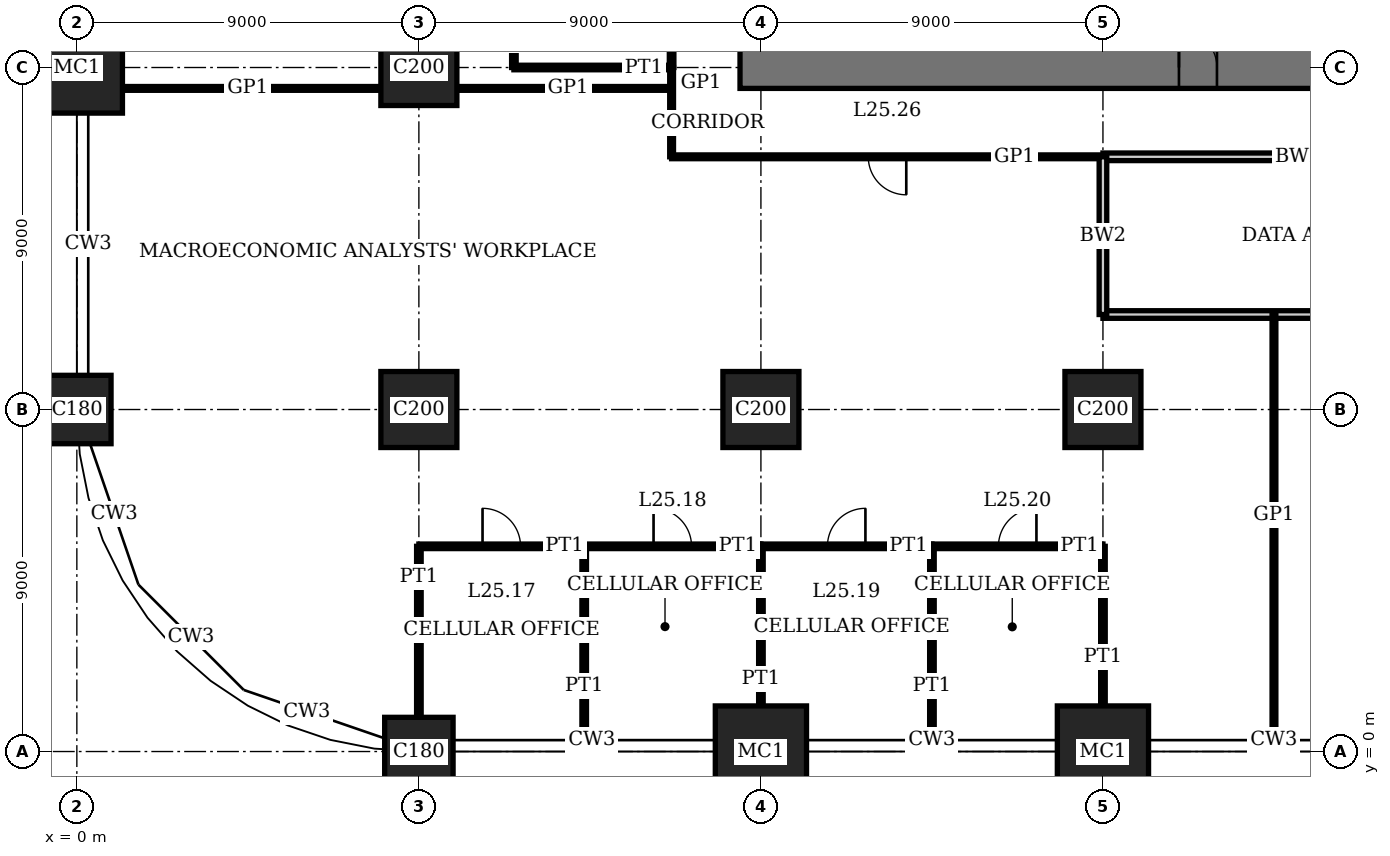
"""IFC4 building model, lengths in metres.
Left out: names, types, materials, properties, quantities, classifications, styles, units other than length and angle.
Written with IfcOpenShell. Run it as: python <this file> out.ifc"""

import sys

from ifc_helpers import new_model, si_unit, direction, frame, frame_2d, origin, origin_2d, place, context, subcontext, project, spatial, rectangle, extrude, element, fill, save


model = new_model("IFC4")
c1 = context("Model", 3, precision=1e-05, world=origin(), true_north=direction((0.0, 1.0)))
c2 = subcontext(c1, "Body", "Model", "MODEL_VIEW")
j1 = project(units=[si_unit("LENGTHUNIT", "METRE"), si_unit("PLANEANGLEUNIT", "RADIAN")], contexts=[c1])
p1 = place(None, origin())
s1 = spatial("IfcSite", under=j1, at=p1, CompositionType="ELEMENT")
p2 = place(p1, origin())
s2 = spatial("IfcBuilding", under=s1, at=p2, CompositionType="ELEMENT")
p3 = place(p2, frame((0.0, 0.0, 105.0)))
s3 = spatial("IfcBuildingStorey", under=s2, at=p3, CompositionType="ELEMENT", Elevation=105.0)
p4 = place(p3, frame((0.0, 9.0, 0.0), z_axis=(0.0, 0.0, 1.0), x_axis=(1.0, 0.0, 0.0)))
e1 = element("IfcColumn", 1, at=p4, inside=s3, PredefinedType="COLUMN", context=c2, shape_type="SweptSolid", body=[
    extrude(rectangle(XDim=1.8, YDim=1.8, at=origin_2d()), origin(), (0.0, 0.0, 1.0), 4.0),
])
p5 = place(p3, frame((0.0, 18.0, 0.0), z_axis=(0.0, 0.0, 1.0), x_axis=(1.0, 0.0, 0.0)))
e2 = element("IfcColumn", 2, at=p5, inside=s3, PredefinedType="COLUMN", context=c2, shape_type="SweptSolid", body=[
    extrude(rectangle(XDim=2.4, YDim=2.4, at=origin_2d()), origin(), (0.0, 0.0, 1.0), 4.0),
])
p6 = place(p3, frame((9.0, 0.0, 0.0), z_axis=(0.0, 0.0, 1.0), x_axis=(1.0, 0.0, 0.0)))
e3 = element("IfcColumn", 3, at=p6, inside=s3, PredefinedType="COLUMN", context=c2, shape_type="SweptSolid", body=[
    extrude(rectangle(XDim=1.8, YDim=1.8, at=origin_2d()), origin(), (0.0, 0.0, 1.0), 4.0),
])
for number, where, z_axis, x_axis in (
    (4, (9.0, 9.0, 0.0), (0.0, 0.0, 1.0), (1.0, 0.0, 0.0)),
    (5, (9.0, 18.0, 0.0), (0.0, 0.0, 1.0), (1.0, 0.0, 0.0)),
):
    element("IfcColumn", number, at=place(p3, frame(where, z_axis=z_axis, x_axis=x_axis)), inside=s3, PredefinedType="COLUMN", context=c2, shape_type="SweptSolid", body=[
        extrude(rectangle(XDim=2.0, YDim=2.0, at=origin_2d()), origin(), (0.0, 0.0, 1.0), 4.0),
    ])
p7 = place(p3, frame((18.0, 0.0, 0.0), z_axis=(0.0, 0.0, 1.0), x_axis=(1.0, 0.0, 0.0)))
e6 = element("IfcColumn", 6, at=p7, inside=s3, PredefinedType="COLUMN", context=c2, shape_type="SweptSolid", body=[
    extrude(rectangle(XDim=2.4, YDim=2.4, at=origin_2d()), origin(), (0.0, 0.0, 1.0), 4.0),
])
p8 = place(p3, frame((18.0, 9.0, 0.0), z_axis=(0.0, 0.0, 1.0), x_axis=(1.0, 0.0, 0.0)))
e7 = element("IfcColumn", 7, at=p8, inside=s3, PredefinedType="COLUMN", context=c2, shape_type="SweptSolid", body=[
    extrude(rectangle(XDim=2.0, YDim=2.0, at=origin_2d()), origin(), (0.0, 0.0, 1.0), 4.0),
])
p9 = place(p3, frame((27.0, 0.0, 0.0), z_axis=(0.0, 0.0, 1.0), x_axis=(1.0, 0.0, 0.0)))
e8 = element("IfcColumn", 8, at=p9, inside=s3, PredefinedType="COLUMN", context=c2, shape_type="SweptSolid", body=[
    extrude(rectangle(XDim=2.4, YDim=2.4, at=origin_2d()), origin(), (0.0, 0.0, 1.0), 4.0),
])
p10 = place(p3, frame((27.0, 9.0, 0.0), z_axis=(0.0, 0.0, 1.0), x_axis=(1.0, 0.0, 0.0)))
e9 = element("IfcColumn", 9, at=p10, inside=s3, PredefinedType="COLUMN", context=c2, shape_type="SweptSolid", body=[
    extrude(rectangle(XDim=2.0, YDim=2.0, at=origin_2d()), origin(), (0.0, 0.0, 1.0), 4.0),
])
p11 = place(p3, frame((17.45, 18.0, 0.0), z_axis=(0.0, 0.0, 1.0), x_axis=(1.0, 0.0, 0.0)))
e10 = element("IfcWall", 10, at=p11, inside=s3, PredefinedType="SHEAR", context=c2, shape_type="SweptSolid", body=[
    extrude(rectangle(XDim=28.1, YDim=1.1, at=frame_2d((14.05, 0.0))), origin(), (0.0, 0.0, 1.0), 4.0),
])
p12 = place(p11, frame((11.55, 0.0, 0.0)))
e11 = element("IfcOpeningElement", 11, at=p12, cuts=e10, PredefinedType="OPENING", context=c2, shape_type="SweptSolid", body=[
    extrude(rectangle(XDim=1.0, YDim=2.4, at=frame_2d((0.5, 1.2))), frame((0.0, 0.56, 0.0), z_axis=(0.0, -1.0, 0.0), x_axis=(1.0, 0.0, 0.0)), (0.0, 0.0, 1.0), 1.12),
])
p13 = place(p11, frame((16.55, 0.0, 0.0)))
e12 = element("IfcOpeningElement", 12, at=p13, cuts=e10, PredefinedType="OPENING", context=c2, shape_type="SweptSolid", body=[
    extrude(rectangle(XDim=1.0, YDim=2.4, at=frame_2d((0.5, 1.2))), frame((0.0, 0.56, 0.0), z_axis=(0.0, -1.0, 0.0), x_axis=(1.0, 0.0, 0.0)), (0.0, 0.0, 1.0), 1.12),
])
p14 = place(p11, frame((20.0, 0.0, 0.0)))
e13 = element("IfcOpeningElement", 13, at=p14, cuts=e10, PredefinedType="OPENING", context=c2, shape_type="SweptSolid", body=[
    extrude(rectangle(XDim=1.1, YDim=2.4, at=frame_2d((0.55, 1.2))), frame((0.0, 0.56, 0.0), z_axis=(0.0, -1.0, 0.0), x_axis=(1.0, 0.0, 0.0)), (0.0, 0.0, 1.0), 1.12),
])
p15 = place(p11, frame((24.05, 0.0, 0.0)))
e14 = element("IfcOpeningElement", 14, at=p15, cuts=e10, PredefinedType="OPENING", context=c2, shape_type="SweptSolid", body=[
    extrude(rectangle(XDim=1.0, YDim=2.4, at=frame_2d((0.5, 1.2))), frame((0.0, 0.56, 0.0), z_axis=(0.0, -1.0, 0.0), x_axis=(1.0, 0.0, 0.0)), (0.0, 0.0, 1.0), 1.12),
])
p16 = place(p3, frame((9.0, 5.4, 0.0), z_axis=(0.0, 0.0, 1.0), x_axis=(1.0, 0.0, 0.0)))
e15 = element("IfcWall", 15, at=p16, inside=s3, PredefinedType="PARTITIONING", context=c2, shape_type="SweptSolid", body=[
    extrude(rectangle(XDim=4.35, YDim=0.12, at=frame_2d((2.175, 0.0))), origin(), (0.0, 0.0, 1.0), 3.75),
])
p17 = place(p16, frame((1.675, 0.0, 0.0)))
e16 = element("IfcOpeningElement", 16, at=p17, cuts=e15, PredefinedType="OPENING", context=c2, shape_type="SweptSolid", body=[
    extrude(rectangle(XDim=1.0, YDim=2.4, at=frame_2d((0.5, 1.2))), frame((0.0, 0.07, 0.0), z_axis=(0.0, -1.0, 0.0), x_axis=(1.0, 0.0, 0.0)), (0.0, 0.0, 1.0), 0.14),
])
p18 = place(p3, frame((13.35, 5.4, 0.0), z_axis=(0.0, 0.0, 1.0), x_axis=(1.0, 0.0, 0.0)))
e17 = element("IfcWall", 17, at=p18, inside=s3, PredefinedType="PARTITIONING", context=c2, shape_type="SweptSolid", body=[
    extrude(rectangle(XDim=4.65, YDim=0.12, at=frame_2d((2.325, 0.0))), origin(), (0.0, 0.0, 1.0), 3.75),
])
p19 = place(p18, frame((1.825, 0.0, 0.0)))
e18 = element("IfcOpeningElement", 18, at=p19, cuts=e17, PredefinedType="OPENING", context=c2, shape_type="SweptSolid", body=[
    extrude(rectangle(XDim=1.0, YDim=2.4, at=frame_2d((0.5, 1.2))), frame((0.0, 0.07, 0.0), z_axis=(0.0, -1.0, 0.0), x_axis=(1.0, 0.0, 0.0)), (0.0, 0.0, 1.0), 0.14),
])
p20 = place(p3, frame((18.0, 5.4, 0.0), z_axis=(0.0, 0.0, 1.0), x_axis=(1.0, 0.0, 0.0)))
e19 = element("IfcWall", 19, at=p20, inside=s3, PredefinedType="PARTITIONING", context=c2, shape_type="SweptSolid", body=[
    extrude(rectangle(XDim=4.5, YDim=0.12, at=frame_2d((2.25, 0.0))), origin(), (0.0, 0.0, 1.0), 3.75),
])
p21 = place(p20, frame((1.75, 0.0, 0.0)))
e20 = element("IfcOpeningElement", 20, at=p21, cuts=e19, PredefinedType="OPENING", context=c2, shape_type="SweptSolid", body=[
    extrude(rectangle(XDim=1.0, YDim=2.4, at=frame_2d((0.5, 1.2))), frame((0.0, 0.07, 0.0), z_axis=(0.0, -1.0, 0.0), x_axis=(1.0, 0.0, 0.0)), (0.0, 0.0, 1.0), 0.14),
])
p22 = place(p3, frame((22.5, 5.4, 0.0), z_axis=(0.0, 0.0, 1.0), x_axis=(1.0, 0.0, 0.0)))
e21 = element("IfcWall", 21, at=p22, inside=s3, PredefinedType="PARTITIONING", context=c2, shape_type="SweptSolid", body=[
    extrude(rectangle(XDim=4.5, YDim=0.12, at=frame_2d((2.25, 0.0))), origin(), (0.0, 0.0, 1.0), 3.75),
])
p23 = place(p22, frame((1.75, 0.0, 0.0)))
e22 = element("IfcOpeningElement", 22, at=p23, cuts=e21, PredefinedType="OPENING", context=c2, shape_type="SweptSolid", body=[
    extrude(rectangle(XDim=1.0, YDim=2.4, at=frame_2d((0.5, 1.2))), frame((0.0, 0.07, 0.0), z_axis=(0.0, -1.0, 0.0), x_axis=(1.0, 0.0, 0.0)), (0.0, 0.0, 1.0), 0.14),
])
p24 = place(p3, frame((27.0, 11.5, 0.0), z_axis=(0.0, 0.0, 1.0), x_axis=(1.0, 0.0, 0.0)))
e23 = element("IfcWall", 23, at=p24, inside=s3, PredefinedType="SOLIDWALL", context=c2, shape_type="SweptSolid", body=[
    extrude(rectangle(XDim=13.5, YDim=0.2, at=frame_2d((6.75, 0.0))), origin(), (0.0, 0.0, 1.0), 3.75),
])
p25 = place(p24, frame((6.25, 0.0, 0.0)))
e24 = element("IfcOpeningElement", 24, at=p25, cuts=e23, PredefinedType="OPENING", context=c2, shape_type="SweptSolid", body=[
    extrude(rectangle(XDim=1.0, YDim=2.4, at=frame_2d((0.5, 1.2))), frame((0.0, 0.11, 0.0), z_axis=(0.0, -1.0, 0.0), x_axis=(1.0, 0.0, 0.0)), (0.0, 0.0, 1.0), 0.22),
])
p26 = place(p3, frame((27.0, 15.65, 0.0), z_axis=(0.0, 0.0, 1.0), x_axis=(1.0, 0.0, 0.0)))
e25 = element("IfcWall", 25, at=p26, inside=s3, PredefinedType="SOLIDWALL", context=c2, shape_type="SweptSolid", body=[
    extrude(rectangle(XDim=13.5, YDim=0.2, at=frame_2d((6.75, 0.0))), origin(), (0.0, 0.0, 1.0), 3.75),
])
p27 = place(p3, frame((15.65, 15.65, 0.0), z_axis=(0.0, 0.0, 1.0), x_axis=(1.0, 0.0, 0.0)))
e26 = element("IfcWall", 26, at=p27, inside=s3, PredefinedType="PARTITIONING", context=c2, shape_type="SweptSolid", body=[
    extrude(rectangle(XDim=11.35, YDim=0.1, at=frame_2d((5.675, 0.0))), origin(), (0.0, 0.0, 1.0), 3.75),
])
p28 = place(p27, frame((5.175, 0.0, 0.0)))
e27 = element("IfcOpeningElement", 27, at=p28, cuts=e26, PredefinedType="OPENING", context=c2, shape_type="SweptSolid", body=[
    extrude(rectangle(XDim=1.0, YDim=2.4, at=frame_2d((0.5, 1.2))), frame((0.0, 0.06, 0.0), z_axis=(0.0, -1.0, 0.0), x_axis=(1.0, 0.0, 0.0)), (0.0, 0.0, 1.0), 0.12),
])
p29 = place(p3, frame((1.2, 17.45, 0.0), z_axis=(0.0, 0.0, 1.0), x_axis=(1.0, 0.0, 0.0)))
e28 = element("IfcWall", 28, at=p29, inside=s3, PredefinedType="PARTITIONING", context=c2, shape_type="SweptSolid", body=[
    extrude(rectangle(XDim=6.8, YDim=0.1, at=frame_2d((3.4, 0.0))), origin(), (0.0, 0.0, 1.0), 3.75),
])
p30 = place(p3, frame((10.0, 17.45, 0.0), z_axis=(0.0, 0.0, 1.0), x_axis=(1.0, 0.0, 0.0)))
e29 = element("IfcWall", 29, at=p30, inside=s3, PredefinedType="PARTITIONING", context=c2, shape_type="SweptSolid", body=[
    extrude(rectangle(XDim=5.65, YDim=0.1, at=frame_2d((2.825, 0.0))), origin(), (0.0, 0.0, 1.0), 3.75),
])
p31 = place(p3, frame((11.5, 18.0, 0.0), z_axis=(0.0, 0.0, 1.0), x_axis=(1.0, 0.0, 0.0)))
e30 = element("IfcWall", 30, at=p31, inside=s3, PredefinedType="PARTITIONING", context=c2, shape_type="SweptSolid", body=[
    extrude(rectangle(XDim=4.15, YDim=0.12, at=frame_2d((2.075, 0.0))), origin(), (0.0, 0.0, 1.0), 3.05),
])
p32 = place(p3, frame((9.0, 0.9, 0.0), z_axis=(0.0, 0.0, 1.0), x_axis=(0.0, 1.0, 0.0)))
e31 = element("IfcWall", 31, at=p32, inside=s3, PredefinedType="PARTITIONING", context=c2, shape_type="SweptSolid", body=[
    extrude(rectangle(XDim=4.5, YDim=0.12, at=frame_2d((2.25, 0.0))), origin(), (0.0, 0.0, 1.0), 3.05),
])
p33 = place(p3, frame((11.5, 18.0, 0.0), z_axis=(0.0, 0.0, 1.0), x_axis=(0.0, 1.0, 0.0)))
e32 = element("IfcWall", 32, at=p33, inside=s3, PredefinedType="PARTITIONING", context=c2, shape_type="SweptSolid", body=[
    extrude(rectangle(XDim=4.5, YDim=0.12, at=frame_2d((2.25, 0.0))), origin(), (0.0, 0.0, 1.0), 3.75),
])
p34 = place(p33, frame((1.75, 0.0, 0.0)))
e33 = element("IfcOpeningElement", 33, at=p34, cuts=e32, PredefinedType="OPENING", context=c2, shape_type="SweptSolid", body=[
    extrude(rectangle(XDim=1.0, YDim=2.4, at=frame_2d((0.5, 1.2))), frame((0.0, 0.07, 0.0), z_axis=(0.0, -1.0, 0.0), x_axis=(1.0, 0.0, 0.0)), (0.0, 0.0, 1.0), 0.14),
])
p35 = place(p3, frame((13.35, 0.31, 0.0), z_axis=(0.0, 0.0, 1.0), x_axis=(0.0, 1.0, 0.0)))
e34 = element("IfcWall", 34, at=p35, inside=s3, PredefinedType="PARTITIONING", context=c2, shape_type="SweptSolid", body=[
    extrude(rectangle(XDim=5.09, YDim=0.12, at=frame_2d((2.545, 0.0))), origin(), (0.0, 0.0, 1.0), 3.75),
])
p36 = place(p3, frame((15.65, 18.0, 0.0), z_axis=(0.0, 0.0, 1.0), x_axis=(0.0, 1.0, 0.0)))
e35 = element("IfcWall", 35, at=p36, inside=s3, PredefinedType="PARTITIONING", context=c2, shape_type="SweptSolid", body=[
    extrude(rectangle(XDim=4.5, YDim=0.12, at=frame_2d((2.25, 0.0))), origin(), (0.0, 0.0, 1.0), 3.75),
])
p37 = place(p3, frame((15.65, 15.65, 0.0), z_axis=(0.0, 0.0, 1.0), x_axis=(0.0, 1.0, 0.0)))
e36 = element("IfcWall", 36, at=p37, inside=s3, PredefinedType="PARTITIONING", context=c2, shape_type="SweptSolid", body=[
    extrude(rectangle(XDim=2.35, YDim=0.1, at=frame_2d((1.175, 0.0))), origin(), (0.0, 0.0, 1.0), 3.75),
])
p38 = place(p3, frame((18.0, 1.2, 0.0), z_axis=(0.0, 0.0, 1.0), x_axis=(0.0, 1.0, 0.0)))
e37 = element("IfcWall", 37, at=p38, inside=s3, PredefinedType="PARTITIONING", context=c2, shape_type="SweptSolid", body=[
    extrude(rectangle(XDim=4.2, YDim=0.12, at=frame_2d((2.1, 0.0))), origin(), (0.0, 0.0, 1.0), 3.05),
])
p39 = place(p3, frame((22.5, 0.31, 0.0), z_axis=(0.0, 0.0, 1.0), x_axis=(0.0, 1.0, 0.0)))
e38 = element("IfcWall", 38, at=p39, inside=s3, PredefinedType="PARTITIONING", context=c2, shape_type="SweptSolid", body=[
    extrude(rectangle(XDim=5.09, YDim=0.12, at=frame_2d((2.545, 0.0))), origin(), (0.0, 0.0, 1.0), 3.75),
])
p40 = place(p3, frame((27.0, 11.5, 0.0), z_axis=(0.0, 0.0, 1.0), x_axis=(0.0, 1.0, 0.0)))
e39 = element("IfcWall", 39, at=p40, inside=s3, PredefinedType="SOLIDWALL", context=c2, shape_type="SweptSolid", body=[
    extrude(rectangle(XDim=4.15, YDim=0.2, at=frame_2d((2.075, 0.0))), origin(), (0.0, 0.0, 1.0), 3.05),
])
p41 = place(p3, frame((27.0, 1.2, 0.0), z_axis=(0.0, 0.0, 1.0), x_axis=(0.0, 1.0, 0.0)))
e40 = element("IfcWall", 40, at=p41, inside=s3, PredefinedType="PARTITIONING", context=c2, shape_type="SweptSolid", body=[
    extrude(rectangle(XDim=4.2, YDim=0.12, at=frame_2d((2.1, 0.0))), origin(), (0.0, 0.0, 1.0), 3.05),
])
p42 = place(p3, frame((31.5, 0.31, 0.0), z_axis=(0.0, 0.0, 1.0), x_axis=(0.0, 1.0, 0.0)))
e41 = element("IfcWall", 41, at=p42, inside=s3, PredefinedType="PARTITIONING", context=c2, shape_type="SweptSolid", body=[
    extrude(rectangle(XDim=11.2, YDim=0.1, at=frame_2d((5.6, 0.0))), origin(), (0.0, 0.0, 1.0), 3.75),
])
p43 = place(p12, origin())
e42 = element("IfcDoor", 42, at=p43, inside=s3, OperationType="SINGLE_SWING_RIGHT", PredefinedType="DOOR", context=c2, shape_type="SweptSolid", body=[
    extrude(rectangle(XDim=1.0, YDim=2.4, at=frame_2d((0.5, 1.2))), frame((0.0, 0.025, 0.0), z_axis=(0.0, -1.0, 0.0), x_axis=(1.0, 0.0, 0.0)), (0.0, 0.0, 1.0), 0.05),
    extrude(rectangle(XDim=0.04, YDim=2.4, at=frame_2d((0.02, 1.2))), frame((0.0, 0.4, 0.0), z_axis=(0.0, -1.0, 0.0), x_axis=(1.0, 0.0, 0.0)), (0.0, 0.0, 1.0), 0.8),
    extrude(rectangle(XDim=0.04, YDim=2.4, at=frame_2d((0.98, 1.2))), frame((0.0, 0.4, 0.0), z_axis=(0.0, -1.0, 0.0), x_axis=(1.0, 0.0, 0.0)), (0.0, 0.0, 1.0), 0.8),
    extrude(rectangle(XDim=1.0, YDim=0.04, at=frame_2d((0.5, 2.38))), frame((0.0, 0.4, 0.0), z_axis=(0.0, -1.0, 0.0), x_axis=(1.0, 0.0, 0.0)), (0.0, 0.0, 1.0), 0.8),
])
fill(e11, e42)
p44 = place(p17, origin())
e43 = element("IfcDoor", 43, at=p44, inside=s3, OperationType="SINGLE_SWING_RIGHT", PredefinedType="DOOR", context=c2, shape_type="SweptSolid", body=[
    extrude(rectangle(XDim=1.0, YDim=2.4, at=frame_2d((0.5, 1.2))), frame((0.0, 0.025, 0.0), z_axis=(0.0, -1.0, 0.0), x_axis=(1.0, 0.0, 0.0)), (0.0, 0.0, 1.0), 0.05),
])
fill(e16, e43)
p45 = place(p19, origin())
e44 = element("IfcDoor", 44, at=p45, inside=s3, OperationType="SINGLE_SWING_RIGHT", PredefinedType="DOOR", context=c2, shape_type="SweptSolid", body=[
    extrude(rectangle(XDim=1.0, YDim=2.4, at=frame_2d((0.5, 1.2))), frame((0.0, 0.025, 0.0), z_axis=(0.0, -1.0, 0.0), x_axis=(1.0, 0.0, 0.0)), (0.0, 0.0, 1.0), 0.05),
])
fill(e18, e44)
p46 = place(p21, origin())
e45 = element("IfcDoor", 45, at=p46, inside=s3, OperationType="SINGLE_SWING_LEFT", PredefinedType="DOOR", context=c2, shape_type="SweptSolid", body=[
    extrude(rectangle(XDim=1.0, YDim=2.4, at=frame_2d((0.5, 1.2))), frame((0.0, 0.025, 0.0), z_axis=(0.0, -1.0, 0.0), x_axis=(1.0, 0.0, 0.0)), (0.0, 0.0, 1.0), 0.05),
])
fill(e20, e45)
p47 = place(p23, origin())
e46 = element("IfcDoor", 46, at=p47, inside=s3, OperationType="SINGLE_SWING_LEFT", PredefinedType="DOOR", context=c2, shape_type="SweptSolid", body=[
    extrude(rectangle(XDim=1.0, YDim=2.4, at=frame_2d((0.5, 1.2))), frame((0.0, 0.025, 0.0), z_axis=(0.0, -1.0, 0.0), x_axis=(1.0, 0.0, 0.0)), (0.0, 0.0, 1.0), 0.05),
])
fill(e22, e46)
p48 = place(p28, origin())
e47 = element("IfcDoor", 47, at=p48, inside=s3, OperationType="SINGLE_SWING_RIGHT", PredefinedType="DOOR", context=c2, shape_type="SweptSolid", body=[
    extrude(rectangle(XDim=1.0, YDim=2.4, at=frame_2d((0.5, 1.2))), frame((0.0, 0.02, 0.0), z_axis=(0.0, -1.0, 0.0), x_axis=(1.0, 0.0, 0.0)), (0.0, 0.0, 1.0), 0.04),
])
fill(e27, e47)
save(model, sys.argv[1])
